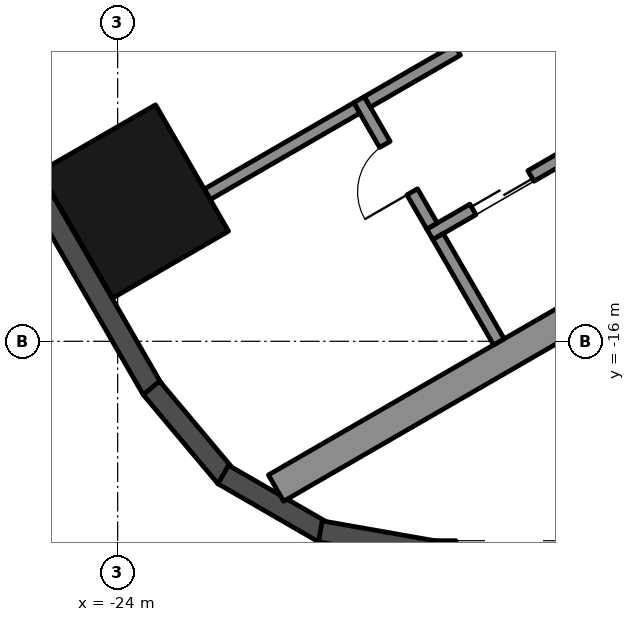
"""IFC4 building model, lengths in metres.
Left out: names, types, materials, properties, quantities, classifications, styles, units other than length and angle.
Written with IfcOpenShell. Run it as: python <this file> out.ifc"""

import sys

from ifc_helpers import new_model, si_unit, direction, frame, frame_2d, origin, origin_2d, place, context, subcontext, project, spatial, rectangle, hollow_rectangle, extrude, element, fill, save


model = new_model("IFC4")
c1 = context("Model", 3, precision=1e-05, world=origin(), true_north=direction((0.0, 1.0)))
c2 = subcontext(c1, "Body", "Model", "MODEL_VIEW")
j1 = project(units=[si_unit("LENGTHUNIT", "METRE"), si_unit("PLANEANGLEUNIT", "RADIAN")], contexts=[c1])
p1 = place(None, origin())
s1 = spatial("IfcSite", under=j1, at=p1, CompositionType="ELEMENT")
p2 = place(p1, origin())
s2 = spatial("IfcBuilding", under=s1, at=p2, CompositionType="ELEMENT")
p3 = place(p2, frame((0.0, 0.0, 205.8)))
s3 = spatial("IfcBuildingStorey", under=s2, at=p3, CompositionType="ELEMENT", Elevation=205.8)
p4 = place(p3, frame((-23.729, -13.7, 0.0), z_axis=(0.0, 0.0, 1.0), x_axis=(-0.5, 0.866025403784, 0.0)))
e1 = element("IfcColumn", 1, at=p4, inside=s3, PredefinedType="COLUMN", context=c2, shape_type="SweptSolid", body=[
    extrude(hollow_rectangle(XDim=2.4, YDim=2.2, WallThickness=0.06, at=origin_2d()), origin(), (0.0, 0.0, 1.0), 3.7),
])
p5 = place(p3, frame((-26.257, -11.893, 0.0), z_axis=(0.0, 0.0, 1.0), x_axis=(0.500018773155, -0.866014564827, 0.0)))
e2 = element("IfcWall", 2, at=p5, inside=s3, PredefinedType="SOLIDWALL", context=c2, shape_type="SweptSolid", body=[
    extrude(rectangle(XDim=5.658, YDim=0.35, at=frame_2d((2.829, 0.0))), origin(), (0.0, 0.0, 1.0), 3.55),
])
for number, where, z_axis, x_axis in (
    (3, (-23.445, -16.768, 0.0), (0.0, 0.0, 1.0), (0.643, -0.766, 0.0)),
    (4, (-22.264, -18.192, 0.0), (0.0, 0.0, 1.0), (0.866, -0.5, 0.0)),
):
    element("IfcWall", number, at=place(p3, frame(where, z_axis=z_axis, x_axis=x_axis)), inside=s3, PredefinedType="SOLIDWALL", context=c2, shape_type="SweptSolid", body=[
        extrude(rectangle(XDim=1.91, YDim=0.35, at=frame_2d((0.955, 0.0))), origin(), (0.0, 0.0, 1.0), 3.55),
    ])
p6 = place(p3, frame((-20.667, -19.126, 0.0), z_axis=(0.0, 0.0, 1.0), x_axis=(0.984798995425, -0.173697837091, 0.0)))
e5 = element("IfcWall", 5, at=p6, inside=s3, PredefinedType="SOLIDWALL", context=c2, shape_type="SweptSolid", body=[
    extrude(rectangle(XDim=1.91, YDim=0.35, at=frame_2d((0.955, 0.0))), origin(), (0.0, 0.0, 1.0), 3.55),
])
p7 = place(p3, frame((-18.816, -19.455, 0.0), z_axis=(0.0, 0.0, 1.0), x_axis=(1.0, 0.0, 0.0)))
e6 = element("IfcWall", 6, at=p7, inside=s3, PredefinedType="SOLIDWALL", context=c2, shape_type="SweptSolid", body=[
    extrude(rectangle(XDim=11.816, YDim=0.35, at=frame_2d((5.908, 0.0))), origin(), (0.0, 0.0, 1.0), 3.55),
])
p8 = place(p7, frame((0.381, 0.0, 0.3)))
e7 = element("IfcOpeningElement", 7, at=p8, cuts=e6, PredefinedType="OPENING", context=c2, shape_type="SweptSolid", body=[
    extrude(rectangle(XDim=1.9, YDim=2.65, at=frame_2d((0.95, 1.325))), frame((0.0, 0.185, 0.0), z_axis=(0.0, -1.0, 0.0), x_axis=(1.0, 0.0, 0.0)), (0.0, 0.0, 1.0), 0.37),
])
p9 = place(p7, frame((7.79, 0.0, 0.0)))
e8 = element("IfcOpeningElement", 8, at=p9, cuts=e6, PredefinedType="OPENING", context=c2, shape_type="SweptSolid", body=[
    extrude(rectangle(XDim=2.4, YDim=2.4, at=frame_2d((1.2, 1.2))), frame((0.0, 0.185, 0.0), z_axis=(0.0, -1.0, 0.0), x_axis=(1.0, 0.0, 0.0)), (0.0, 0.0, 1.0), 0.37),
])
p10 = place(p7, frame((3.741, 0.0, 0.3)))
e9 = element("IfcOpeningElement", 9, at=p10, cuts=e6, PredefinedType="OPENING", context=c2, shape_type="SweptSolid", body=[
    extrude(rectangle(XDim=1.7, YDim=2.65, at=frame_2d((0.85, 1.325))), frame((0.0, 0.185, 0.0), z_axis=(0.0, -1.0, 0.0), x_axis=(1.0, 0.0, 0.0)), (0.0, 0.0, 1.0), 0.37),
])
p11 = place(p7, frame((5.741, 0.0, 0.3)))
e10 = element("IfcOpeningElement", 10, at=p11, cuts=e6, PredefinedType="OPENING", context=c2, shape_type="SweptSolid", body=[
    extrude(rectangle(XDim=1.7, YDim=2.65, at=frame_2d((0.85, 1.325))), frame((0.0, 0.185, 0.0), z_axis=(0.0, -1.0, 0.0), x_axis=(1.0, 0.0, 0.0)), (0.0, 0.0, 1.0), 0.37),
])
p12 = place(p3, frame((-8.547, -10.997, 0.0), z_axis=(0.0, 0.0, 1.0), x_axis=(-0.866025009528, -0.500000682871, 0.0)))
e11 = element("IfcWall", 11, at=p12, inside=s3, PredefinedType="SHEAR", context=c2, shape_type="SweptSolid", body=[
    extrude(rectangle(XDim=14.837, YDim=0.5, at=frame_2d((7.418, 0.0))), origin(), (0.0, 0.0, 1.0), 3.5),
])
p13 = place(p3, frame((-10.068, -9.162, 0.0), z_axis=(0.0, 0.0, 1.0), x_axis=(-0.866032725843, -0.499987317609, 0.0)))
e12 = element("IfcWall", 12, at=p13, inside=s3, PredefinedType="SHEAR", context=c2, shape_type="SweptSolid", body=[
    extrude(rectangle(XDim=10.16, YDim=0.2, at=frame_2d((5.08, 0.0))), origin(), (0.0, 0.0, 1.0), 3.5),
])
p14 = place(p13, frame((0.62, 0.0, 0.0)))
e13 = element("IfcOpeningElement", 13, at=p14, cuts=e12, PredefinedType="OPENING", context=c2, shape_type="SweptSolid", body=[
    extrude(rectangle(XDim=1.1, YDim=2.1, at=frame_2d((0.55, 1.05))), frame((0.0, 0.11, 0.0), z_axis=(0.0, -1.0, 0.0), x_axis=(1.0, 0.0, 0.0)), (0.0, 0.0, 1.0), 0.22),
])
p15 = place(p13, frame((3.16, 0.0, 0.0)))
e14 = element("IfcOpeningElement", 14, at=p15, cuts=e12, PredefinedType="OPENING", context=c2, shape_type="SweptSolid", body=[
    extrude(rectangle(XDim=1.1, YDim=2.1, at=frame_2d((0.55, 1.05))), frame((0.0, 0.11, 0.0), z_axis=(0.0, -1.0, 0.0), x_axis=(1.0, 0.0, 0.0)), (0.0, 0.0, 1.0), 0.22),
])
p16 = place(p13, frame((5.7, 0.0, 0.0)))
e15 = element("IfcOpeningElement", 15, at=p16, cuts=e12, PredefinedType="OPENING", context=c2, shape_type="SweptSolid", body=[
    extrude(rectangle(XDim=1.1, YDim=2.1, at=frame_2d((0.55, 1.05))), frame((0.0, 0.11, 0.0), z_axis=(0.0, -1.0, 0.0), x_axis=(1.0, 0.0, 0.0)), (0.0, 0.0, 1.0), 0.22),
])
p17 = place(p13, frame((8.24, 0.0, 0.0)))
e16 = element("IfcOpeningElement", 16, at=p17, cuts=e12, PredefinedType="OPENING", context=c2, shape_type="SweptSolid", body=[
    extrude(rectangle(XDim=1.1, YDim=2.1, at=frame_2d((0.55, 1.05))), frame((0.0, 0.11, 0.0), z_axis=(0.0, -1.0, 0.0), x_axis=(1.0, 0.0, 0.0)), (0.0, 0.0, 1.0), 0.22),
])
p18 = place(p3, frame((-20.031, -12.026, 0.0), z_axis=(0.0, 0.0, 1.0), x_axis=(0.500033551112, -0.866006032174, 0.0)))
e17 = element("IfcWall", 17, at=p18, inside=s3, PredefinedType="SHEAR", context=c2, shape_type="SweptSolid", body=[
    extrude(rectangle(XDim=2.4, YDim=0.2, at=frame_2d((1.2, 0.0))), origin(), (0.0, 0.0, 1.0), 3.5),
])
p19 = place(p18, frame((0.85, 0.0, 0.0)))
e18 = element("IfcOpeningElement", 18, at=p19, cuts=e17, PredefinedType="OPENING", context=c2, shape_type="SweptSolid", body=[
    extrude(rectangle(XDim=0.9, YDim=2.1, at=frame_2d((0.45, 1.05))), frame((0.0, 0.11, 0.0), z_axis=(0.0, -1.0, 0.0), x_axis=(1.0, 0.0, 0.0)), (0.0, 0.0, 1.0), 0.22),
])
p20 = place(p3, frame((-18.413, -11.208, 0.0), z_axis=(0.0, 0.0, 1.0), x_axis=(-0.866038183914, -0.499977863513, 0.0)))
e19 = element("IfcWall", 19, at=p20, inside=s3, PredefinedType="SHEAR", context=c2, shape_type="SweptSolid", body=[
    extrude(rectangle(XDim=1.71, YDim=0.2, at=frame_2d((0.855, 0.0))), origin(), (0.0, 0.0, 1.0), 3.5),
])
p21 = place(p3, frame((-18.73, -14.278, 0.0), z_axis=(0.0, 0.0, 1.0), x_axis=(0.50002537861, -0.866010750942, 0.0)))
e20 = element("IfcWall", 20, at=p21, inside=s3, PredefinedType="SHEAR", context=c2, shape_type="SweptSolid", body=[
    extrude(rectangle(XDim=2.0, YDim=0.2, at=frame_2d((1.0, 0.0))), origin(), (0.0, 0.0, 1.0), 3.5),
])
p22 = place(p3, frame((-20.067, -12.163, 0.0), z_axis=(0.0, 0.0, 1.0), x_axis=(-0.866055327414, -0.49994816717, 0.0)))
e21 = element("IfcWall", 21, at=p22, inside=s3, PredefinedType="SHEAR", context=c2, shape_type="SweptSolid", body=[
    extrude(rectangle(XDim=2.84, YDim=0.2, at=frame_2d((1.42, 0.0))), origin(), (0.0, 0.0, 1.0), 3.5),
])
p23 = place(p17, origin())
e22 = element("IfcDoor", 22, at=p23, inside=s3, OperationType="DOUBLE_DOOR_SLIDING", PredefinedType="DOOR", context=c2, shape_type="SweptSolid", body=[
    extrude(rectangle(XDim=1.1, YDim=2.1, at=frame_2d((0.55, 1.05))), frame((0.0, 0.025, 0.0), z_axis=(0.0, -1.0, 0.0), x_axis=(1.0, 0.0, 0.0)), (0.0, 0.0, 1.0), 0.05),
])
fill(e16, e22)
p24 = place(p19, frame((0.9, 0.0, 0.0), z_axis=(0.0, 0.0, 1.0), x_axis=(-1.0, 0.0, 0.0)))
e23 = element("IfcDoor", 23, at=p24, inside=s3, OperationType="SINGLE_SWING_LEFT", PredefinedType="DOOR", context=c2, shape_type="SweptSolid", body=[
    extrude(rectangle(XDim=0.9, YDim=2.1, at=frame_2d((0.45, 1.05))), frame((0.0, 0.025, 0.0), z_axis=(0.0, -1.0, 0.0), x_axis=(1.0, 0.0, 0.0)), (0.0, 0.0, 1.0), 0.05),
])
fill(e18, e23)
save(model, sys.argv[1])
